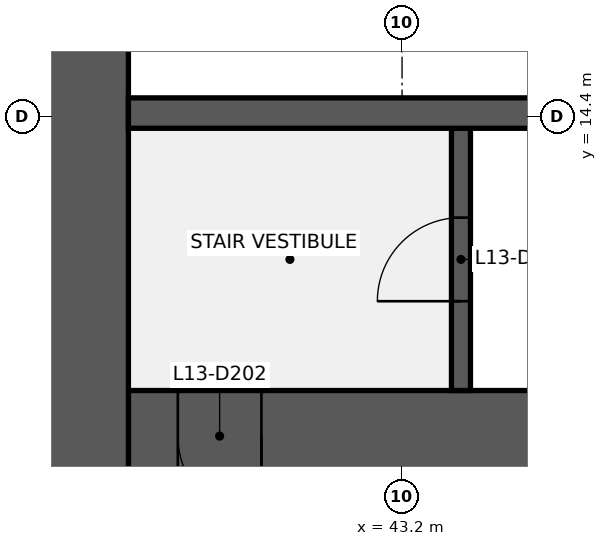
"""IFC4 building model, lengths in metres.
Left out: names, types, materials, properties, quantities, classifications, styles, units other than length and angle.
Written with IfcOpenShell. Run it as: python <this file> out.ifc"""

import sys

from ifc_helpers import new_model, si_unit, direction, frame, frame_2d, origin, place, context, subcontext, project, spatial, rectangle, extrude, element, fill, save


model = new_model("IFC4")
c1 = context("Model", 3, precision=1e-05, world=origin(), true_north=direction((0.0, 1.0)))
c2 = subcontext(c1, "Body", "Model", "MODEL_VIEW")
j1 = project(units=[si_unit("LENGTHUNIT", "METRE"), si_unit("PLANEANGLEUNIT", "RADIAN")], contexts=[c1])
p1 = place(None, origin())
s1 = spatial("IfcSite", under=j1, at=p1, CompositionType="ELEMENT")
p2 = place(p1, origin())
s2 = spatial("IfcBuilding", under=s1, at=p2, CompositionType="ELEMENT")
p3 = place(p2, frame((0.0, 0.0, 63.0)))
s3 = spatial("IfcBuildingStorey", under=s2, at=p3, CompositionType="ELEMENT", Elevation=63.0)
p4 = place(p3, frame((52.8, 10.2, 0.0), z_axis=(0.0, 0.0, 1.0), x_axis=(-1.0, 0.0, 0.0)))
e1 = element("IfcWall", 1, at=p4, inside=s3, PredefinedType="SHEAR", context=c2, shape_type="SweptSolid", body=[
    extrude(rectangle(XDim=13.2, YDim=1.2, at=frame_2d((6.6, 0.0))), origin(), (0.0, 0.0, 1.0), 3.84),
])
p5 = place(p4, frame((11.45, 0.0, 0.0)))
e2 = element("IfcOpeningElement", 2, at=p5, cuts=e1, PredefinedType="OPENING", context=c2, shape_type="SweptSolid", body=[
    extrude(rectangle(XDim=1.1, YDim=2.1, at=frame_2d((0.55, 1.05))), frame((0.0, 0.61, 0.0), z_axis=(0.0, -1.0, 0.0), x_axis=(1.0, 0.0, 0.0)), (0.0, 0.0, 1.0), 1.22),
])
p6 = place(p3, frame((39.0, 9.6, 0.0), z_axis=(0.0, 0.0, 1.0), x_axis=(0.0, 1.0, 0.0)))
e3 = element("IfcWall", 3, at=p6, inside=s3, PredefinedType="SHEAR", context=c2, shape_type="SweptSolid", body=[
    extrude(rectangle(XDim=28.8, YDim=1.2, at=frame_2d((14.4, 0.0))), origin(), (0.0, 0.0, 1.0), 3.84),
])
p7 = place(p6, frame((8.7, 0.0, 0.0)))
e4 = element("IfcOpeningElement", 4, at=p7, cuts=e3, PredefinedType="OPENING", context=c2, shape_type="SweptSolid", body=[
    extrude(rectangle(XDim=1.8, YDim=2.1, at=frame_2d((0.9, 1.05))), frame((0.0, 0.61, 0.0), z_axis=(0.0, -1.0, 0.0), x_axis=(1.0, 0.0, 0.0)), (0.0, 0.0, 1.0), 1.22),
])
p8 = place(p6, frame((18.3, 0.0, 0.0)))
e5 = element("IfcOpeningElement", 5, at=p8, cuts=e3, PredefinedType="OPENING", context=c2, shape_type="SweptSolid", body=[
    extrude(rectangle(XDim=1.8, YDim=2.1, at=frame_2d((0.9, 1.05))), frame((0.0, 0.61, 0.0), z_axis=(0.0, -1.0, 0.0), x_axis=(1.0, 0.0, 0.0)), (0.0, 0.0, 1.0), 1.22),
])
p9 = place(p3, frame((43.975, 10.8, 0.0), z_axis=(0.0, 0.0, 1.0), x_axis=(0.0, 1.0, 0.0)))
e6 = element("IfcWall", 6, at=p9, inside=s3, PredefinedType="SHEAR", context=c2, shape_type="SweptSolid", body=[
    extrude(rectangle(XDim=3.45, YDim=0.25, at=frame_2d((1.725, 0.0))), origin(), (0.0, 0.0, 1.0), 3.84),
])
p10 = place(p9, frame((1.175, 0.0, 0.0)))
e7 = element("IfcOpeningElement", 7, at=p10, cuts=e6, PredefinedType="OPENING", context=c2, shape_type="SweptSolid", body=[
    extrude(rectangle(XDim=1.1, YDim=2.1, at=frame_2d((0.55, 1.05))), frame((0.0, 0.135, 0.0), z_axis=(0.0, -1.0, 0.0), x_axis=(1.0, 0.0, 0.0)), (0.0, 0.0, 1.0), 0.27),
])
p11 = place(p3, frame((39.6, 14.45, 0.0), z_axis=(0.0, 0.0, 1.0), x_axis=(1.0, 0.0, 0.0)))
e8 = element("IfcWall", 8, at=p11, inside=s3, PredefinedType="SHEAR", context=c2, shape_type="SweptSolid", body=[
    extrude(rectangle(XDim=16.8, YDim=0.4, at=frame_2d((8.4, 0.0))), origin(), (0.0, 0.0, 1.0), 3.84),
])
p12 = place(p10, origin())
e9 = element("IfcDoor", 9, at=p12, inside=s3, OperationType="SINGLE_SWING_LEFT", PredefinedType="DOOR", context=c2, shape_type="SweptSolid", body=[
    extrude(rectangle(XDim=1.1, YDim=2.1, at=frame_2d((0.55, 1.05))), frame((0.0, 0.025, 0.0), z_axis=(0.0, -1.0, 0.0), x_axis=(1.0, 0.0, 0.0)), (0.0, 0.0, 1.0), 0.05),
])
fill(e7, e9)
p13 = place(p5, origin())
e10 = element("IfcDoor", 10, at=p13, inside=s3, OperationType="SINGLE_SWING_LEFT", PredefinedType="DOOR", context=c2, shape_type="SweptSolid", body=[
    extrude(rectangle(XDim=1.1, YDim=2.1, at=frame_2d((0.55, 1.05))), frame((0.0, 0.025, 0.0), z_axis=(0.0, -1.0, 0.0), x_axis=(1.0, 0.0, 0.0)), (0.0, 0.0, 1.0), 0.05),
])
fill(e2, e10)
save(model, sys.argv[1])
